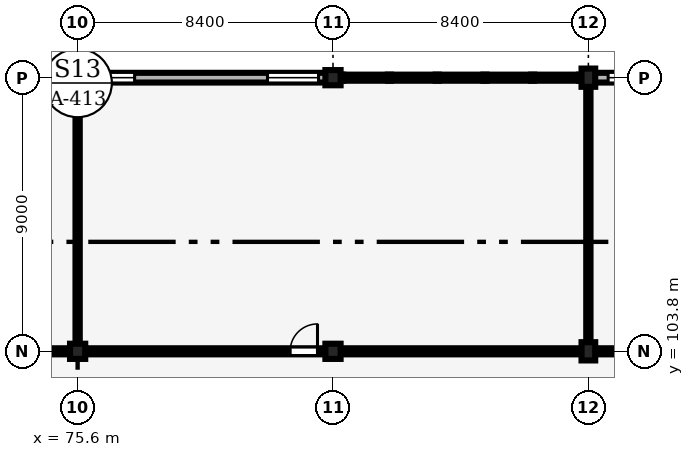
"""IFC4 building model, lengths in metres.
Left out: names, types, materials, properties, quantities, classifications, styles, units other than length and angle.
Written with IfcOpenShell. Run it as: python <this file> out.ifc"""

import sys

from ifc_helpers import new_model, si_unit, direction, frame, frame_2d, origin, origin_2d, place, context, subcontext, project, spatial, rectangle, extrude, element, fill, save


model = new_model("IFC4")
c1 = context("Model", 3, precision=1e-05, world=origin(), true_north=direction((0.0, 1.0)))
c2 = subcontext(c1, "Body", "Model", "MODEL_VIEW")
j1 = project(units=[si_unit("LENGTHUNIT", "METRE"), si_unit("PLANEANGLEUNIT", "RADIAN")], contexts=[c1])
p1 = place(None, origin())
s1 = spatial("IfcSite", under=j1, at=p1, CompositionType="ELEMENT")
p2 = place(p1, origin())
s2 = spatial("IfcBuilding", under=s1, at=p2, CompositionType="ELEMENT")
p3 = place(p2, frame((0.0, 0.0, 13.2)))
s3 = spatial("IfcBuildingStorey", under=s2, at=p3, CompositionType="ELEMENT", Elevation=13.2)
for number, where, z_axis, x_axis in (
    (1, (75.6, 103.8, 0.0), (0.0, 0.0, 1.0), (1.0, 0.0, 0.0)),
    (2, (75.6, 112.8, 0.0), (0.0, 0.0, 1.0), (1.0, 0.0, 0.0)),
    (3, (84.0, 103.8, 0.0), (0.0, 0.0, 1.0), (1.0, 0.0, 0.0)),
    (4, (84.0, 112.8, 0.0), (0.0, 0.0, 1.0), (1.0, 0.0, 0.0)),
):
    element("IfcColumn", number, at=place(p3, frame(where, z_axis=z_axis, x_axis=x_axis)), inside=s3, PredefinedType="COLUMN", context=c2, shape_type="SweptSolid", body=[
        extrude(rectangle(XDim=0.5, YDim=0.5, at=origin_2d()), origin(), (0.0, 0.0, 1.0), 4.2),
    ])
for number, where, z_axis, x_axis in (
    (5, (92.4, 103.8, 0.0), (0.0, 0.0, 1.0), (1.0, 0.0, 0.0)),
    (6, (92.4, 112.8, 0.0), (0.0, 0.0, 1.0), (1.0, 0.0, 0.0)),
):
    element("IfcColumn", number, at=place(p3, frame(where, z_axis=z_axis, x_axis=x_axis)), inside=s3, PredefinedType="COLUMN", context=c2, shape_type="SweptSolid", body=[
        extrude(rectangle(XDim=0.45, YDim=0.6, at=origin_2d()), origin(), (0.0, 0.0, 1.0), 4.2),
    ])
p4 = place(p3, frame((75.825, 112.8, 0.0), z_axis=(0.0, 0.0, 1.0), x_axis=(1.0, 0.0, 0.0)))
e7 = element("IfcWall", 7, at=p4, inside=s3, PredefinedType="SOLIDWALL", context=c2, shape_type="SweptSolid", body=[
    extrude(rectangle(XDim=7.95, YDim=0.32, at=frame_2d((3.975, 0.0))), origin(), (0.0, 0.0, 1.0), 2.96),
])
p5 = place(p4, frame((0.45, 0.0, 0.9)))
e8 = element("IfcOpeningElement", 8, at=p5, cuts=e7, PredefinedType="OPENING", context=c2, shape_type="SweptSolid", body=[
    extrude(rectangle(XDim=1.2, YDim=1.8, at=frame_2d((0.6, 0.9))), frame((0.0, 0.17, 0.0), z_axis=(0.0, -1.0, 0.0), x_axis=(1.0, 0.0, 0.0)), (0.0, 0.0, 1.0), 0.34),
])
p6 = place(p4, frame((6.02, 0.0, 0.9)))
e9 = element("IfcOpeningElement", 9, at=p6, cuts=e7, PredefinedType="OPENING", context=c2, shape_type="SweptSolid", body=[
    extrude(rectangle(XDim=1.68, YDim=1.91, at=frame_2d((0.84, 0.955))), frame((0.0, 0.17, 0.0), z_axis=(0.0, -1.0, 0.0), x_axis=(1.0, 0.0, 0.0)), (0.0, 0.0, 1.0), 0.34),
])
p7 = place(p3, frame((92.6, 112.8, 0.0), z_axis=(0.0, 0.0, 1.0), x_axis=(1.0, 0.0, 0.0)))
e10 = element("IfcWall", 10, at=p7, inside=s3, PredefinedType="SOLIDWALL", context=c2, shape_type="SweptSolid", body=[
    extrude(rectangle(XDim=8.0, YDim=0.32, at=frame_2d((4.0, 0.0))), origin(), (0.0, 0.0, 1.0), 3.43),
])
p8 = place(p7, frame((0.45, 0.0, 0.9)))
e11 = element("IfcOpeningElement", 11, at=p8, cuts=e10, PredefinedType="OPENING", context=c2, shape_type="SweptSolid", body=[
    extrude(rectangle(XDim=1.2, YDim=1.5, at=frame_2d((0.6, 0.75))), frame((0.0, 0.17, 0.0), z_axis=(0.0, -1.0, 0.0), x_axis=(1.0, 0.0, 0.0)), (0.0, 0.0, 1.0), 0.34),
])
p9 = place(p7, frame((6.35, 0.0, 0.9)))
e12 = element("IfcOpeningElement", 12, at=p9, cuts=e10, PredefinedType="OPENING", context=c2, shape_type="SweptSolid", body=[
    extrude(rectangle(XDim=1.2, YDim=1.8, at=frame_2d((0.6, 0.9))), frame((0.0, 0.17, 0.0), z_axis=(0.0, -1.0, 0.0), x_axis=(1.0, 0.0, 0.0)), (0.0, 0.0, 1.0), 0.34),
])
p10 = place(p3, frame((75.6, 103.905, 0.0), z_axis=(0.0, 0.0, 1.0), x_axis=(0.0, 1.0, 0.0)))
e13 = element("IfcWall", 13, at=p10, inside=s3, PredefinedType="PARTITIONING", context=c2, shape_type="SweptSolid", body=[
    extrude(rectangle(XDim=8.79, YDim=0.14, at=frame_2d((4.395, 0.0))), origin(), (0.0, 0.0, 1.0), 3.16),
])
p11 = place(p3, frame((92.4, 103.905, 0.0), z_axis=(0.0, 0.0, 1.0), x_axis=(0.0, 1.0, 0.0)))
e14 = element("IfcWall", 14, at=p11, inside=s3, PredefinedType="PARTITIONING", context=c2, shape_type="SweptSolid", body=[
    extrude(rectangle(XDim=8.79, YDim=0.14, at=frame_2d((4.395, 0.0))), origin(), (0.0, 0.0, 1.0), 3.48),
])
p12 = place(p3, frame((67.46, 103.8, 0.0), z_axis=(0.0, 0.0, 1.0), x_axis=(1.0, 0.0, 0.0)))
e15 = element("IfcWall", 15, at=p12, inside=s3, PredefinedType="PARTITIONING", context=c2, shape_type="SweptSolid", body=[
    extrude(rectangle(XDim=7.88, YDim=0.2, at=frame_2d((3.94, 0.0))), origin(), (0.0, 0.0, 1.0), 3.26),
])
p13 = place(p12, frame((0.25, 0.0, 0.0)))
e16 = element("IfcOpeningElement", 16, at=p13, cuts=e15, PredefinedType="OPENING", context=c2, shape_type="SweptSolid", body=[
    extrude(rectangle(XDim=0.9, YDim=2.1, at=frame_2d((0.45, 1.05))), frame((0.0, 0.11, 0.0), z_axis=(0.0, -1.0, 0.0), x_axis=(1.0, 0.0, 0.0)), (0.0, 0.0, 1.0), 0.22),
])
p14 = place(p3, frame((75.86, 103.8, 0.0), z_axis=(0.0, 0.0, 1.0), x_axis=(1.0, 0.0, 0.0)))
e17 = element("IfcWall", 17, at=p14, inside=s3, PredefinedType="PARTITIONING", context=c2, shape_type="SweptSolid", body=[
    extrude(rectangle(XDim=7.88, YDim=0.2, at=frame_2d((3.94, 0.0))), origin(), (0.0, 0.0, 1.0), 3.21),
])
p15 = place(p14, frame((6.73, 0.0, 0.0)))
e18 = element("IfcOpeningElement", 18, at=p15, cuts=e17, PredefinedType="OPENING", context=c2, shape_type="SweptSolid", body=[
    extrude(rectangle(XDim=0.9, YDim=2.1, at=frame_2d((0.45, 1.05))), frame((0.0, 0.11, 0.0), z_axis=(0.0, -1.0, 0.0), x_axis=(1.0, 0.0, 0.0)), (0.0, 0.0, 1.0), 0.22),
])
p16 = place(p3, frame((84.26, 103.8, 0.0), z_axis=(0.0, 0.0, 1.0), x_axis=(1.0, 0.0, 0.0)))
e19 = element("IfcWall", 19, at=p16, inside=s3, PredefinedType="PARTITIONING", context=c2, shape_type="SweptSolid", body=[
    extrude(rectangle(XDim=7.905, YDim=0.2, at=frame_2d((3.953, 0.0))), origin(), (0.0, 0.0, 1.0), 3.43),
])
p17 = place(p3, frame((92.635, 103.8, 0.0), z_axis=(0.0, 0.0, 1.0), x_axis=(1.0, 0.0, 0.0)))
e20 = element("IfcWall", 20, at=p17, inside=s3, PredefinedType="PARTITIONING", context=c2, shape_type="SweptSolid", body=[
    extrude(rectangle(XDim=7.93, YDim=0.2, at=frame_2d((3.965, 0.0))), origin(), (0.0, 0.0, 1.0), 3.48),
])
p18 = place(p17, frame((5.615, 0.0, 0.0)))
e21 = element("IfcOpeningElement", 21, at=p18, cuts=e20, PredefinedType="OPENING", context=c2, shape_type="SweptSolid", body=[
    extrude(rectangle(XDim=0.9, YDim=2.1, at=frame_2d((0.45, 1.05))), frame((0.0, 0.11, 0.0), z_axis=(0.0, -1.0, 0.0), x_axis=(1.0, 0.0, 0.0)), (0.0, 0.0, 1.0), 0.22),
])
p19 = place(p5, origin())
e22 = element("IfcWindow", 22, at=p19, inside=s3, PartitioningType="SINGLE_PANEL", PredefinedType="WINDOW", context=c2, shape_type="SweptSolid", body=[
    extrude(rectangle(XDim=1.2, YDim=1.8, at=frame_2d((0.6, 0.9))), frame((0.0, 0.03, 0.0), z_axis=(0.0, -1.0, 0.0), x_axis=(1.0, 0.0, 0.0)), (0.0, 0.0, 1.0), 0.06),
])
fill(e8, e22)
p20 = place(p6, origin())
e23 = element("IfcWindow", 23, at=p20, inside=s3, PartitioningType="SINGLE_PANEL", PredefinedType="WINDOW", context=c2, shape_type="SweptSolid", body=[
    extrude(rectangle(XDim=1.68, YDim=1.91, at=frame_2d((0.84, 0.955))), frame((0.0, 0.03, 0.0), z_axis=(0.0, -1.0, 0.0), x_axis=(1.0, 0.0, 0.0)), (0.0, 0.0, 1.0), 0.06),
])
fill(e9, e23)
p21 = place(p8, origin())
e24 = element("IfcWindow", 24, at=p21, inside=s3, PartitioningType="SINGLE_PANEL", PredefinedType="WINDOW", context=c2, shape_type="SweptSolid", body=[
    extrude(rectangle(XDim=1.2, YDim=1.5, at=frame_2d((0.6, 0.75))), frame((0.0, 0.03, 0.0), z_axis=(0.0, -1.0, 0.0), x_axis=(1.0, 0.0, 0.0)), (0.0, 0.0, 1.0), 0.06),
])
fill(e11, e24)
p22 = place(p15, origin())
e25 = element("IfcDoor", 25, at=p22, inside=s3, OperationType="SINGLE_SWING_RIGHT", PredefinedType="DOOR", context=c2, shape_type="SweptSolid", body=[
    extrude(rectangle(XDim=0.9, YDim=2.1, at=frame_2d((0.45, 1.05))), frame((0.0, 0.025, 0.0), z_axis=(0.0, -1.0, 0.0), x_axis=(1.0, 0.0, 0.0)), (0.0, 0.0, 1.0), 0.05),
])
fill(e18, e25)
save(model, sys.argv[1])
